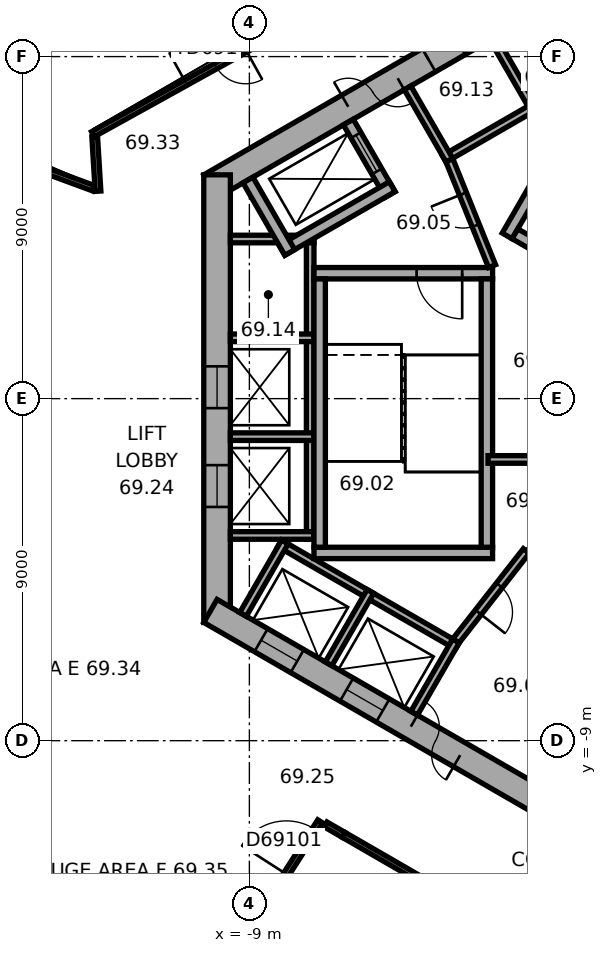
"""IFC4 building model, lengths in metres.
Left out: names, types, materials, properties, quantities, classifications, styles, units other than length and angle.
Written with IfcOpenShell. Run it as: python <this file> out.ifc"""

import sys

from ifc_helpers import new_model, si_unit, direction, frame, frame_2d, origin, place, context, subcontext, project, spatial, rectangle, extrude, element, fill, save


model = new_model("IFC4")
c1 = context("Model", 3, precision=1e-05, world=origin(), true_north=direction((0.0, 1.0)))
c2 = subcontext(c1, "Body", "Model", "MODEL_VIEW")
j1 = project(units=[si_unit("LENGTHUNIT", "METRE"), si_unit("PLANEANGLEUNIT", "RADIAN")], contexts=[c1])
p1 = place(None, origin())
s1 = spatial("IfcSite", under=j1, at=p1, CompositionType="ELEMENT")
p2 = place(p1, origin())
s2 = spatial("IfcBuilding", under=s1, at=p2, CompositionType="ELEMENT")
p3 = place(p2, frame((0.0, 0.0, 278.3)))
s3 = spatial("IfcBuildingStorey", under=s2, at=p3, CompositionType="ELEMENT", Elevation=278.3)
p4 = place(p3, frame((0.175, 11.475, 0.0), z_axis=(0.0, 0.0, 1.0), x_axis=(-0.866026453023, -0.499998182661, 0.0)))
e1 = element("IfcWall", 1, at=p4, inside=s3, PredefinedType="SHEAR", context=c2, shape_type="SweptSolid", body=[
    extrude(rectangle(XDim=11.778, YDim=0.7, at=frame_2d((5.889, 0.0))), origin(), (0.0, 0.0, 1.0), 7.4),
])
p5 = place(p4, frame((6.089, 0.0, 0.0)))
e2 = element("IfcOpeningElement", 2, at=p5, cuts=e1, PredefinedType="OPENING", context=c2, shape_type="SweptSolid", body=[
    extrude(rectangle(XDim=1.5, YDim=2.1, at=frame_2d((0.75, 1.05))), frame((0.0, 0.36, 0.0), z_axis=(0.0, -1.0, 0.0), x_axis=(1.0, 0.0, 0.0)), (0.0, 0.0, 1.0), 0.72),
])
p6 = place(p4, frame((1.639, 0.0, 0.0)))
e3 = element("IfcOpeningElement", 3, at=p6, cuts=e1, PredefinedType="OPENING", context=c2, shape_type="SweptSolid", body=[
    extrude(rectangle(XDim=0.9, YDim=2.1, at=frame_2d((0.45, 1.05))), frame((0.0, 0.36, 0.0), z_axis=(0.0, -1.0, 0.0), x_axis=(1.0, 0.0, 0.0)), (0.0, 0.0, 1.0), 0.72),
])
p7 = place(p4, frame((4.239, 0.0, 0.0)))
e4 = element("IfcOpeningElement", 4, at=p7, cuts=e1, PredefinedType="OPENING", context=c2, shape_type="SweptSolid", body=[
    extrude(rectangle(XDim=0.9, YDim=2.1, at=frame_2d((0.45, 1.05))), frame((0.0, 0.36, 0.0), z_axis=(0.0, -1.0, 0.0), x_axis=(1.0, 0.0, 0.0)), (0.0, 0.0, 1.0), 0.72),
])
p8 = place(p3, frame((-9.85, 5.889, 0.0), z_axis=(0.0, 0.0, 1.0), x_axis=(0.0, -1.0, 0.0)))
e5 = element("IfcWall", 5, at=p8, inside=s3, PredefinedType="SHEAR", context=c2, shape_type="SweptSolid", body=[
    extrude(rectangle(XDim=11.778, YDim=0.7, at=frame_2d((5.889, 0.0))), origin(), (0.0, 0.0, 1.0), 7.4),
])
p9 = place(p8, frame((5.039, 0.0, 0.0)))
e6 = element("IfcOpeningElement", 6, at=p9, cuts=e5, PredefinedType="OPENING", context=c2, shape_type="SweptSolid", body=[
    extrude(rectangle(XDim=1.1, YDim=2.1, at=frame_2d((0.55, 1.05))), frame((0.0, 0.36, 0.0), z_axis=(0.0, -1.0, 0.0), x_axis=(1.0, 0.0, 0.0)), (0.0, 0.0, 1.0), 0.72),
])
p10 = place(p8, frame((7.639, 0.0, 0.0)))
e7 = element("IfcOpeningElement", 7, at=p10, cuts=e5, PredefinedType="OPENING", context=c2, shape_type="SweptSolid", body=[
    extrude(rectangle(XDim=1.1, YDim=2.1, at=frame_2d((0.55, 1.05))), frame((0.0, 0.36, 0.0), z_axis=(0.0, -1.0, 0.0), x_axis=(1.0, 0.0, 0.0)), (0.0, 0.0, 1.0), 0.72),
])
p11 = place(p3, frame((-10.025, -5.586, 0.0), z_axis=(0.0, 0.0, 1.0), x_axis=(0.866026453023, -0.499998182661, 0.0)))
e8 = element("IfcWall", 8, at=p11, inside=s3, PredefinedType="SHEAR", context=c2, shape_type="SweptSolid", body=[
    extrude(rectangle(XDim=11.778, YDim=0.7, at=frame_2d((5.889, 0.0))), origin(), (0.0, 0.0, 1.0), 7.4),
])
p12 = place(p11, frame((6.089, 0.0, 0.0)))
e9 = element("IfcOpeningElement", 9, at=p12, cuts=e8, PredefinedType="OPENING", context=c2, shape_type="SweptSolid", body=[
    extrude(rectangle(XDim=1.5, YDim=2.1, at=frame_2d((0.75, 1.05))), frame((0.0, 0.36, 0.0), z_axis=(0.0, -1.0, 0.0), x_axis=(1.0, 0.0, 0.0)), (0.0, 0.0, 1.0), 0.72),
])
p13 = place(p11, frame((1.539, 0.0, 0.0)))
e10 = element("IfcOpeningElement", 10, at=p13, cuts=e8, PredefinedType="OPENING", context=c2, shape_type="SweptSolid", body=[
    extrude(rectangle(XDim=1.1, YDim=2.1, at=frame_2d((0.55, 1.05))), frame((0.0, 0.36, 0.0), z_axis=(0.0, -1.0, 0.0), x_axis=(1.0, 0.0, 0.0)), (0.0, 0.0, 1.0), 0.72),
])
p14 = place(p11, frame((4.139, 0.0, 0.0)))
e11 = element("IfcOpeningElement", 11, at=p14, cuts=e8, PredefinedType="OPENING", context=c2, shape_type="SweptSolid", body=[
    extrude(rectangle(XDim=1.1, YDim=2.1, at=frame_2d((0.55, 1.05))), frame((0.0, 0.36, 0.0), z_axis=(0.0, -1.0, 0.0), x_axis=(1.0, 0.0, 0.0)), (0.0, 0.0, 1.0), 0.72),
])
p15 = place(p3, frame((-18.662, 7.582, 0.0), z_axis=(0.0, 0.0, 1.0), x_axis=(0.938501865144, -0.345274165152, 0.0)))
e12 = element("IfcWall", 12, at=p15, inside=s3, PredefinedType="STANDARD", context=c2, shape_type="SweptSolid", body=[
    extrude(rectangle(XDim=5.93, YDim=0.15, at=frame_2d((2.965, 0.0))), origin(), (0.0, 0.0, 1.0), 2.6),
])
p16 = place(p3, frame((-12.982, 5.458, 0.0), z_axis=(0.0, 0.0, 1.0), x_axis=(-0.06115150754, 0.998128495298, 0.0)))
e13 = element("IfcWall", 13, at=p16, inside=s3, PredefinedType="STANDARD", context=c2, shape_type="SweptSolid", body=[
    extrude(rectangle(XDim=1.437, YDim=0.15, at=frame_2d((0.719, 0.0))), origin(), (0.0, 0.0, 1.0), 2.6),
])
p17 = place(p3, frame((-13.117, 6.958, 0.0), z_axis=(0.0, 0.0, 1.0), x_axis=(0.874660896688, 0.484735304889, 0.0)))
e14 = element("IfcWall", 14, at=p17, inside=s3, PredefinedType="STANDARD", context=c2, shape_type="SweptSolid", body=[
    extrude(rectangle(XDim=14.781, YDim=0.15, at=frame_2d((7.39, 0.0))), origin(), (0.0, 0.0, 1.0), 2.6),
])
p18 = place(p17, frame((2.795, 0.0, 0.0)))
e15 = element("IfcOpeningElement", 15, at=p18, cuts=e14, PredefinedType="OPENING", context=c2, shape_type="SweptSolid", body=[
    extrude(rectangle(XDim=1.8, YDim=2.4, at=frame_2d((0.9, 1.2))), frame((0.0, 0.085, 0.0), z_axis=(0.0, -1.0, 0.0), x_axis=(1.0, 0.0, 0.0)), (0.0, 0.0, 1.0), 0.17),
])
p19 = place(p17, frame((10.186, 0.0, 0.0)))
e16 = element("IfcOpeningElement", 16, at=p19, cuts=e14, PredefinedType="OPENING", context=c2, shape_type="SweptSolid", body=[
    extrude(rectangle(XDim=1.8, YDim=2.4, at=frame_2d((0.9, 1.2))), frame((0.0, 0.085, 0.0), z_axis=(0.0, -1.0, 0.0), x_axis=(1.0, 0.0, 0.0)), (0.0, 0.0, 1.0), 0.17),
])
p20 = place(p3, frame((0.803, 9.009, 0.0), z_axis=(0.0, 0.0, 1.0), x_axis=(-0.866028230842, -0.499995103361, 0.0)))
e17 = element("IfcWall", 17, at=p20, inside=s3, PredefinedType="PARTITIONING", context=c2, shape_type="SweptSolid", body=[
    extrude(rectangle(XDim=5.4, YDim=0.2, at=frame_2d((2.7, 0.0))), origin(), (0.0, 0.0, 1.0), 7.12),
])
for number, where, z_axis, x_axis in (
    (18, (-1.485, 7.572, 0.0), (0.0, 0.0, 1.0), (-0.5, 0.866, 0.0)),
    (19, (-3.737, 6.272, 0.0), (0.0, 0.0, 1.0), (-0.5, 0.866, 0.0)),
):
    element("IfcWall", number, at=place(p3, frame(where, z_axis=z_axis, x_axis=x_axis)), inside=s3, PredefinedType="PARTITIONING", context=c2, shape_type="SweptSolid", body=[
        extrude(rectangle(XDim=2.2, YDim=0.2, at=frame_2d((1.1, 0.0))), origin(), (0.0, 0.0, 1.0), 7.12),
    ])
p21 = place(p3, frame((-7.4, 4.3, 0.0), z_axis=(0.0, 0.0, 1.0), x_axis=(0.0, -1.0, 0.0)))
e20 = element("IfcWall", 20, at=p21, inside=s3, PredefinedType="PARTITIONING", context=c2, shape_type="SweptSolid", body=[
    extrude(rectangle(XDim=8.0, YDim=0.2, at=frame_2d((4.0, 0.0))), origin(), (0.0, 0.0, 1.0), 7.12),
])
for number, where, z_axis, x_axis in (
    (21, (-7.3, 4.2, 0.0), (0.0, 0.0, 1.0), (-1.0, 0.0, 0.0)),
    (22, (-7.3, 1.6, 0.0), (0.0, 0.0, 1.0), (-1.0, 0.0, 0.0)),
    (23, (-7.3, -1.0, 0.0), (0.0, 0.0, 1.0), (-1.0, 0.0, 0.0)),
    (24, (-7.3, -3.6, 0.0), (0.0, 0.0, 1.0), (-1.0, 0.0, 0.0)),
):
    element("IfcWall", number, at=place(p3, frame(where, z_axis=z_axis, x_axis=x_axis)), inside=s3, PredefinedType="PARTITIONING", context=c2, shape_type="SweptSolid", body=[
        extrude(rectangle(XDim=2.2, YDim=0.2, at=frame_2d((1.1, 0.0))), origin(), (0.0, 0.0, 1.0), 7.12),
    ])
p22 = place(p3, frame((-8.203, -3.809, 0.0), z_axis=(0.0, 0.0, 1.0), x_axis=(0.866028230842, -0.499995103361, 0.0)))
e25 = element("IfcWall", 25, at=p22, inside=s3, PredefinedType="PARTITIONING", context=c2, shape_type="SweptSolid", body=[
    extrude(rectangle(XDim=5.4, YDim=0.2, at=frame_2d((2.7, 0.0))), origin(), (0.0, 0.0, 1.0), 7.12),
])
for number, where, z_axis, x_axis in (
    (26, (-8.067, -3.772, 0.0), (0.0, 0.0, 1.0), (-0.5, -0.866, 0.0)),
    (27, (-5.815, -5.072, 0.0), (0.0, 0.0, 1.0), (-0.5, -0.866, 0.0)),
):
    element("IfcWall", number, at=place(p3, frame(where, z_axis=z_axis, x_axis=x_axis)), inside=s3, PredefinedType="PARTITIONING", context=c2, shape_type="SweptSolid", body=[
        extrude(rectangle(XDim=2.2, YDim=0.2, at=frame_2d((1.1, 0.0))), origin(), (0.0, 0.0, 1.0), 7.12),
    ])
p23 = place(p3, frame((-3.563, -6.372, 0.0), z_axis=(0.0, 0.0, 1.0), x_axis=(-0.499994660107, -0.866028486751, 0.0)))
e28 = element("IfcWall", 28, at=p23, inside=s3, PredefinedType="PARTITIONING", context=c2, shape_type="SweptSolid", body=[
    extrude(rectangle(XDim=2.2, YDim=0.2, at=frame_2d((1.1, 0.0))), origin(), (0.0, 0.0, 1.0), 7.12),
])
p24 = place(p3, frame((-2.216, 4.282, 0.0), z_axis=(0.0, 0.0, 1.0), x_axis=(0.499977259774, 0.866038532462, 0.0)))
e29 = element("IfcWall", 29, at=p24, inside=s3, PredefinedType="SHEAR", context=c2, shape_type="SweptSolid", body=[
    extrude(rectangle(XDim=4.7, YDim=0.3, at=frame_2d((2.35, 0.0))), origin(), (0.0, 0.0, 1.0), 7.12),
])
p25 = place(p3, frame((4.103, 0.807, 0.0), z_axis=(0.0, 0.0, 1.0), x_axis=(-0.866027801685, 0.499995846692, 0.0)))
e30 = element("IfcWall", 30, at=p25, inside=s3, PredefinedType="SHEAR", context=c2, shape_type="SweptSolid", body=[
    extrude(rectangle(XDim=7.06, YDim=0.3, at=frame_2d((3.53, 0.0))), origin(), (0.0, 0.0, 1.0), 7.12),
])
p26 = place(p3, frame((-2.6, 3.3, 0.0), z_axis=(0.0, 0.0, 1.0), x_axis=(-1.0, 0.0, 0.0)))
e31 = element("IfcWall", 31, at=p26, inside=s3, PredefinedType="SHEAR", context=c2, shape_type="SweptSolid", body=[
    extrude(rectangle(XDim=4.7, YDim=0.3, at=frame_2d((2.35, 0.0))), origin(), (0.0, 0.0, 1.0), 7.12),
])
p27 = place(p26, frame((0.8, 0.0, 0.0)))
e32 = element("IfcOpeningElement", 32, at=p27, cuts=e31, PredefinedType="OPENING", context=c2, shape_type="SweptSolid", body=[
    extrude(rectangle(XDim=1.2, YDim=2.1, at=frame_2d((0.6, 1.05))), frame((0.0, 0.16, 0.0), z_axis=(0.0, -1.0, 0.0), x_axis=(1.0, 0.0, 0.0)), (0.0, 0.0, 1.0), 0.32),
])
p28 = place(p3, frame((-2.6, -4.06, 0.0), z_axis=(0.0, 0.0, 1.0), x_axis=(-1.0, 0.0, 0.0)))
e33 = element("IfcWall", 33, at=p28, inside=s3, PredefinedType="SHEAR", context=c2, shape_type="SweptSolid", body=[
    extrude(rectangle(XDim=4.7, YDim=0.3, at=frame_2d((2.35, 0.0))), origin(), (0.0, 0.0, 1.0), 7.12),
])
for number, where, z_axis, x_axis in (
    (34, (-2.75, 3.15, 0.0), (0.0, 0.0, 1.0), (0.0, -1.0, 0.0)),
    (35, (-7.15, 3.15, 0.0), (0.0, 0.0, 1.0), (0.0, -1.0, 0.0)),
):
    element("IfcWall", number, at=place(p3, frame(where, z_axis=z_axis, x_axis=x_axis)), inside=s3, PredefinedType="SHEAR", context=c2, shape_type="SweptSolid", body=[
        extrude(rectangle(XDim=7.06, YDim=0.3, at=frame_2d((3.53, 0.0))), origin(), (0.0, 0.0, 1.0), 7.12),
    ])
p29 = place(p3, frame((-5.295, 5.372, 0.0), z_axis=(0.0, 0.0, 1.0), x_axis=(-0.500077893725, 0.86598042715, 0.0)))
e36 = element("IfcWall", 36, at=p29, inside=s3, PredefinedType="SHEAR", context=c2, shape_type="SweptSolid", body=[
    extrude(rectangle(XDim=2.2, YDim=0.3, at=frame_2d((1.1, 0.0))), origin(), (0.0, 0.0, 1.0), 7.12),
])
p30 = place(p29, frame((0.7, 0.0, 0.0)))
e37 = element("IfcOpeningElement", 37, at=p30, cuts=e36, PredefinedType="OPENING", context=c2, shape_type="SweptSolid", body=[
    extrude(rectangle(XDim=1.1, YDim=2.1, at=frame_2d((0.55, 1.05))), frame((0.0, 0.16, 0.0), z_axis=(0.0, -1.0, 0.0), x_axis=(1.0, 0.0, 0.0)), (0.0, 0.0, 1.0), 0.32),
])
p31 = place(p3, frame((-5.24, 5.577, 0.0), z_axis=(0.0, 0.0, 1.0), x_axis=(-0.866014461049, -0.500018952895, 0.0)))
e38 = element("IfcWall", 38, at=p31, inside=s3, PredefinedType="SHEAR", context=c2, shape_type="SweptSolid", body=[
    extrude(rectangle(XDim=3.35, YDim=0.3, at=frame_2d((1.675, 0.0))), origin(), (0.0, 0.0, 1.0), 7.12),
])
p32 = place(p3, frame((-7.937, 3.847, 0.0), z_axis=(0.0, 0.0, 1.0), x_axis=(-0.50002983664, 0.866008176907, 0.0)))
e39 = element("IfcWall", 39, at=p32, inside=s3, PredefinedType="SHEAR", context=c2, shape_type="SweptSolid", body=[
    extrude(rectangle(XDim=2.2, YDim=0.3, at=frame_2d((1.1, 0.0))), origin(), (0.0, 0.0, 1.0), 7.12),
])
p33 = place(p3, frame((-2.615, 3.487, 0.0), z_axis=(0.0, 0.0, 1.0), x_axis=(-0.373576831041, 0.92759924068, 0.0)))
e40 = element("IfcWall", 40, at=p33, inside=s3, PredefinedType="PARTITIONING", context=c2, shape_type="SweptSolid", body=[
    extrude(rectangle(XDim=3.002, YDim=0.2, at=frame_2d((1.501, 0.0))), origin(), (0.0, 0.0, 1.0), 7.12),
])
p34 = place(p33, frame((1.15, 0.0, 0.0)))
e41 = element("IfcOpeningElement", 41, at=p34, cuts=e40, PredefinedType="OPENING", context=c2, shape_type="SweptSolid", body=[
    extrude(rectangle(XDim=0.9, YDim=2.1, at=frame_2d((0.45, 1.05))), frame((0.0, 0.11, 0.0), z_axis=(0.0, -1.0, 0.0), x_axis=(1.0, 0.0, 0.0)), (0.0, 0.0, 1.0), 0.22),
])
p35 = place(p3, frame((-1.712, -4.008, 0.0), z_axis=(0.0, 0.0, 1.0), x_axis=(-0.616549420702, -0.787316208287, 0.0)))
e42 = element("IfcWall", 42, at=p35, inside=s3, PredefinedType="PARTITIONING", context=c2, shape_type="SweptSolid", body=[
    extrude(rectangle(XDim=3.002, YDim=0.2, at=frame_2d((1.501, 0.0))), origin(), (0.0, 0.0, 1.0), 7.12),
])
p36 = place(p35, frame((1.15, 0.0, 0.0)))
e43 = element("IfcOpeningElement", 43, at=p36, cuts=e42, PredefinedType="OPENING", context=c2, shape_type="SweptSolid", body=[
    extrude(rectangle(XDim=0.9, YDim=2.1, at=frame_2d((0.45, 1.05))), frame((0.0, 0.11, 0.0), z_axis=(0.0, -1.0, 0.0), x_axis=(1.0, 0.0, 0.0)), (0.0, 0.0, 1.0), 0.22),
])
p37 = place(p3, frame((-2.72, -1.6, 0.0), z_axis=(0.0, 0.0, 1.0), x_axis=(1.0, 0.0, 0.0)))
e44 = element("IfcWall", 44, at=p37, inside=s3, PredefinedType="PARTITIONING", context=c2, shape_type="SweptSolid", body=[
    extrude(rectangle(XDim=5.269, YDim=0.2, at=frame_2d((2.634, 0.0))), origin(), (0.0, 0.0, 1.0), 7.12),
])
p38 = place(p3, frame((-9.976, -15.545, 0.0), z_axis=(0.0, 0.0, 1.0), x_axis=(0.540123567873, 0.841585724349, 0.0)))
e45 = element("IfcWall", 45, at=p38, inside=s3, PredefinedType="PARTITIONING", context=c2, shape_type="SweptSolid", body=[
    extrude(rectangle(XDim=5.256, YDim=0.15, at=frame_2d((2.628, 0.0))), origin(), (0.0, 0.0, 1.0), 6.57),
])
p39 = place(p38, frame((3.606, 0.0, 0.0)))
e46 = element("IfcOpeningElement", 46, at=p39, cuts=e45, PredefinedType="OPENING", context=c2, shape_type="SweptSolid", body=[
    extrude(rectangle(XDim=1.4, YDim=2.4, at=frame_2d((0.7, 1.2))), frame((0.0, 0.085, 0.0), z_axis=(0.0, -1.0, 0.0), x_axis=(1.0, 0.0, 0.0)), (0.0, 0.0, 1.0), 0.17),
])
p40 = place(p3, frame((-3.888, -12.998, 0.0), z_axis=(0.0, 0.0, 1.0), x_axis=(-0.865984422536, 0.500070974888, 0.0)))
e47 = element("IfcWall", 47, at=p40, inside=s3, PredefinedType="PARTITIONING", context=c2, shape_type="SweptSolid", body=[
    extrude(rectangle(XDim=3.032, YDim=0.15, at=frame_2d((1.516, 0.0))), origin(), (0.0, 0.0, 1.0), 7.12),
])
p41 = place(p3, frame((-6.996, -11.203, 0.0), z_axis=(0.0, 0.0, 1.0), x_axis=(0.866025182435, -0.500000383388, 0.0)))
e48 = element("IfcWall", 48, at=p41, inside=s3, PredefinedType="PARTITIONING", context=c2, shape_type="SweptSolid", body=[
    extrude(rectangle(XDim=0.558, YDim=0.15, at=frame_2d((0.279, 0.0))), origin(), (0.0, 0.0, 1.0), 7.12),
])
p42 = place(p18, origin())
e49 = element("IfcDoor", 49, at=p42, inside=s3, OperationType="DOUBLE_DOOR_DOUBLE_SWING", PredefinedType="DOOR", context=c2, shape_type="SweptSolid", body=[
    extrude(rectangle(XDim=1.8, YDim=2.4, at=frame_2d((0.9, 1.2))), frame((0.0, 0.025, 0.0), z_axis=(0.0, -1.0, 0.0), x_axis=(1.0, 0.0, 0.0)), (0.0, 0.0, 1.0), 0.05),
])
fill(e15, e49)
p43 = place(p5, origin())
e50 = element("IfcDoor", 50, at=p43, inside=s3, OperationType="DOUBLE_DOOR_SINGLE_SWING", PredefinedType="DOOR", context=c2, shape_type="SweptSolid", body=[
    extrude(rectangle(XDim=1.5, YDim=2.1, at=frame_2d((0.75, 1.05))), frame((0.0, 0.025, 0.0), z_axis=(0.0, -1.0, 0.0), x_axis=(1.0, 0.0, 0.0)), (0.0, 0.0, 1.0), 0.05),
])
fill(e2, e50)
p44 = place(p12, origin())
e51 = element("IfcDoor", 51, at=p44, inside=s3, OperationType="DOUBLE_DOOR_SINGLE_SWING", PredefinedType="DOOR", context=c2, shape_type="SweptSolid", body=[
    extrude(rectangle(XDim=1.5, YDim=2.1, at=frame_2d((0.75, 1.05))), frame((0.0, 0.025, 0.0), z_axis=(0.0, -1.0, 0.0), x_axis=(1.0, 0.0, 0.0)), (0.0, 0.0, 1.0), 0.05),
])
fill(e9, e51)
p45 = place(p27, origin())
e52 = element("IfcDoor", 52, at=p45, inside=s3, OperationType="SINGLE_SWING_RIGHT", PredefinedType="DOOR", context=c2, shape_type="SweptSolid", body=[
    extrude(rectangle(XDim=1.2, YDim=2.1, at=frame_2d((0.6, 1.05))), frame((0.0, 0.025, 0.0), z_axis=(0.0, -1.0, 0.0), x_axis=(1.0, 0.0, 0.0)), (0.0, 0.0, 1.0), 0.05),
])
fill(e32, e52)
p46 = place(p34, origin())
e53 = element("IfcDoor", 53, at=p46, inside=s3, OperationType="SINGLE_SWING_LEFT", PredefinedType="DOOR", context=c2, shape_type="SweptSolid", body=[
    extrude(rectangle(XDim=0.9, YDim=2.1, at=frame_2d((0.45, 1.05))), frame((0.0, 0.025, 0.0), z_axis=(0.0, -1.0, 0.0), x_axis=(1.0, 0.0, 0.0)), (0.0, 0.0, 1.0), 0.05),
])
fill(e41, e53)
p47 = place(p36, origin())
e54 = element("IfcDoor", 54, at=p47, inside=s3, OperationType="SINGLE_SWING_LEFT", PredefinedType="DOOR", context=c2, shape_type="SweptSolid", body=[
    extrude(rectangle(XDim=0.9, YDim=2.1, at=frame_2d((0.45, 1.05))), frame((0.0, 0.025, 0.0), z_axis=(0.0, -1.0, 0.0), x_axis=(1.0, 0.0, 0.0)), (0.0, 0.0, 1.0), 0.05),
])
fill(e43, e54)
p48 = place(p7, origin())
e55 = element("IfcDoor", 55, at=p48, inside=s3, OperationType="SINGLE_SWING_LEFT", PredefinedType="DOOR", context=c2, shape_type="SweptSolid", body=[
    extrude(rectangle(XDim=0.9, YDim=2.1, at=frame_2d((0.45, 1.05))), frame((0.0, 0.025, 0.0), z_axis=(0.0, -1.0, 0.0), x_axis=(1.0, 0.0, 0.0)), (0.0, 0.0, 1.0), 0.05),
])
fill(e4, e55)
p49 = place(p30, origin())
e56 = element("IfcDoor", 56, at=p49, inside=s3, OperationType="DOUBLE_DOOR_SLIDING", PredefinedType="DOOR", context=c2, shape_type="SweptSolid", body=[
    extrude(rectangle(XDim=1.1, YDim=2.1, at=frame_2d((0.55, 1.05))), frame((0.0, 0.025, 0.0), z_axis=(0.0, -1.0, 0.0), x_axis=(1.0, 0.0, 0.0)), (0.0, 0.0, 1.0), 0.05),
])
fill(e37, e56)
p50 = place(p9, origin())
e57 = element("IfcDoor", 57, at=p50, inside=s3, OperationType="DOUBLE_DOOR_SLIDING", PredefinedType="DOOR", context=c2, shape_type="SweptSolid", body=[
    extrude(rectangle(XDim=1.1, YDim=2.1, at=frame_2d((0.55, 1.05))), frame((0.0, 0.025, 0.0), z_axis=(0.0, -1.0, 0.0), x_axis=(1.0, 0.0, 0.0)), (0.0, 0.0, 1.0), 0.05),
])
fill(e6, e57)
p51 = place(p10, origin())
e58 = element("IfcDoor", 58, at=p51, inside=s3, OperationType="DOUBLE_DOOR_SLIDING", PredefinedType="DOOR", context=c2, shape_type="SweptSolid", body=[
    extrude(rectangle(XDim=1.1, YDim=2.1, at=frame_2d((0.55, 1.05))), frame((0.0, 0.025, 0.0), z_axis=(0.0, -1.0, 0.0), x_axis=(1.0, 0.0, 0.0)), (0.0, 0.0, 1.0), 0.05),
])
fill(e7, e58)
p52 = place(p13, origin())
e59 = element("IfcDoor", 59, at=p52, inside=s3, OperationType="DOUBLE_DOOR_SLIDING", PredefinedType="DOOR", context=c2, shape_type="SweptSolid", body=[
    extrude(rectangle(XDim=1.1, YDim=2.1, at=frame_2d((0.55, 1.05))), frame((0.0, 0.025, 0.0), z_axis=(0.0, -1.0, 0.0), x_axis=(1.0, 0.0, 0.0)), (0.0, 0.0, 1.0), 0.05),
])
fill(e10, e59)
p53 = place(p14, origin())
e60 = element("IfcDoor", 60, at=p53, inside=s3, OperationType="DOUBLE_DOOR_SLIDING", PredefinedType="DOOR", context=c2, shape_type="SweptSolid", body=[
    extrude(rectangle(XDim=1.1, YDim=2.1, at=frame_2d((0.55, 1.05))), frame((0.0, 0.025, 0.0), z_axis=(0.0, -1.0, 0.0), x_axis=(1.0, 0.0, 0.0)), (0.0, 0.0, 1.0), 0.05),
])
fill(e11, e60)
p54 = place(p39, origin())
e61 = element("IfcDoor", 61, at=p54, inside=s3, OperationType="SINGLE_SWING_LEFT", PredefinedType="DOOR", context=c2, shape_type="SweptSolid", body=[
    extrude(rectangle(XDim=1.4, YDim=2.4, at=frame_2d((0.7, 1.2))), frame((0.0, 0.025, 0.0), z_axis=(0.0, -1.0, 0.0), x_axis=(1.0, 0.0, 0.0)), (0.0, 0.0, 1.0), 0.05),
])
fill(e46, e61)
save(model, sys.argv[1])
